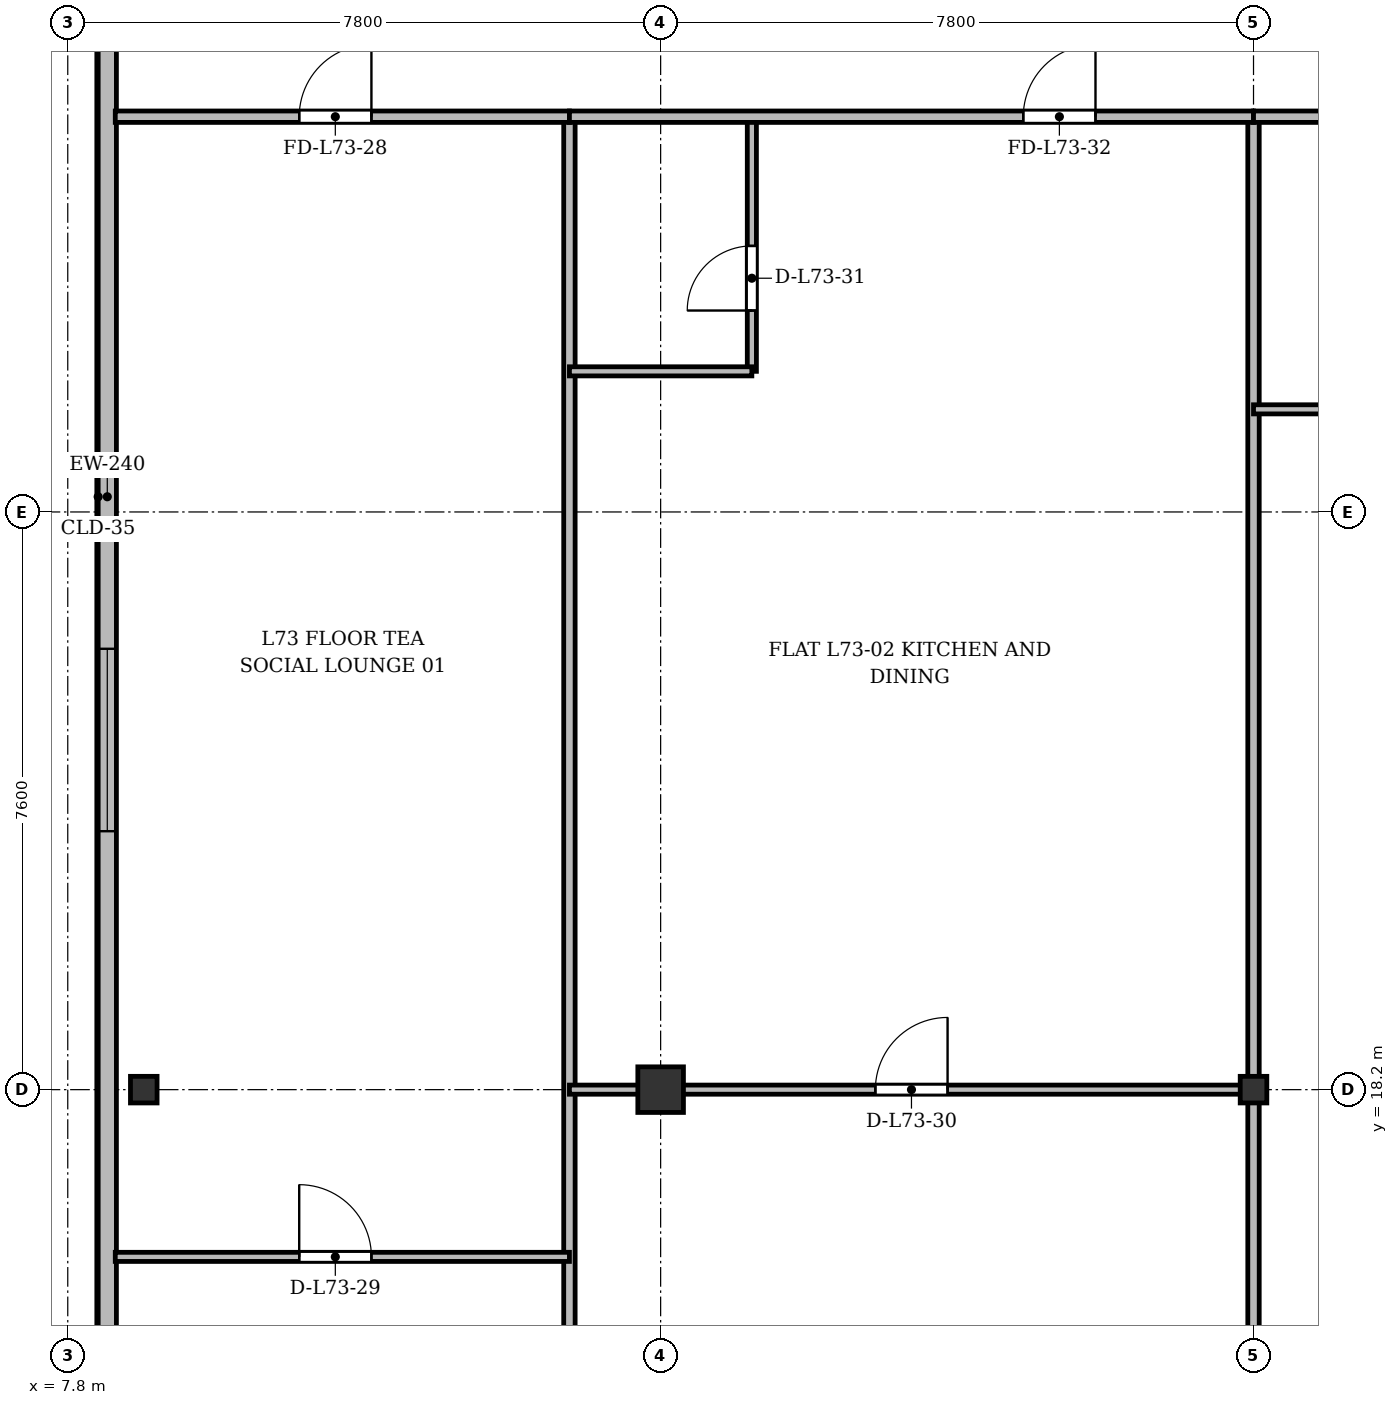
"""IFC4 building model, lengths in metres.
Left out: names, types, materials, properties, quantities, classifications, styles, units other than length and angle.
Written with IfcOpenShell. Run it as: python <this file> out.ifc"""

import sys

from ifc_helpers import new_model, si_unit, direction, frame, frame_2d, origin, origin_2d, place, context, subcontext, project, spatial, rectangle, i_section, extrude, source, transform, mapped, element, fill, save


model = new_model("IFC4")
c1 = context("Model", 3, precision=1e-05, world=origin(), true_north=direction((0.0, 1.0)))
c2 = subcontext(c1, "Body", "Model", "MODEL_VIEW")
j1 = project(units=[si_unit("LENGTHUNIT", "METRE"), si_unit("PLANEANGLEUNIT", "RADIAN")], contexts=[c1])
p1 = place(None, origin())
s1 = spatial("IfcSite", under=j1, at=p1, CompositionType="ELEMENT")
p2 = place(p1, origin())
s2 = spatial("IfcBuilding", under=s1, at=p2, CompositionType="ELEMENT")
p3 = place(p2, frame((0.0, 0.0, 281.1)))
s3 = spatial("IfcBuildingStorey", under=s2, at=p3, CompositionType="ELEMENT", Elevation=281.1)
m1 = source(origin(), c2, "Body", "SweptSolid", [
    extrude(i_section(OverallWidth=0.35, OverallDepth=0.35, WebThickness=0.018, FlangeThickness=0.028, at=origin_2d()), origin(), (0.0, 0.0, 1.0), 3.6),
])
p4 = place(p3, frame((8.8, 18.2, 0.0), z_axis=(0.0, 0.0, 1.0), x_axis=(1.0, 0.0, 0.0)))
e1 = element("IfcColumn", 1, at=p4, inside=s3, PredefinedType="COLUMN", context=c2, shape_type="MappedRepresentation", body=[
    mapped(m1, transform((0.0, 0.0, 0.0), x_axis=(1.0, 0.0, 0.0), y_axis=(0.0, 1.0, 0.0), z_axis=(0.0, 0.0, 1.0), scale=1.0)),
])
m2 = source(origin(), c2, "Body", "SweptSolid", [
    extrude(rectangle(XDim=0.6, YDim=0.6, at=origin_2d()), origin(), (0.0, 0.0, 1.0), 3.6),
])
p5 = place(p3, frame((15.6, 18.2, 0.0), z_axis=(0.0, 0.0, 1.0), x_axis=(1.0, 0.0, 0.0)))
e2 = element("IfcColumn", 2, at=p5, inside=s3, PredefinedType="COLUMN", context=c2, shape_type="MappedRepresentation", body=[
    mapped(m2, transform((0.0, 0.0, 0.0), x_axis=(1.0, 0.0, 0.0), y_axis=(0.0, 1.0, 0.0), z_axis=(0.0, 0.0, 1.0), scale=1.0)),
])
p6 = place(p3, frame((23.4, 18.2, 0.0), z_axis=(0.0, 0.0, 1.0), x_axis=(1.0, 0.0, 0.0)))
e3 = element("IfcColumn", 3, at=p6, inside=s3, PredefinedType="COLUMN", context=c2, shape_type="MappedRepresentation", body=[
    mapped(m1, transform((0.0, 0.0, 0.0), x_axis=(1.0, 0.0, 0.0), y_axis=(0.0, 1.0, 0.0), z_axis=(0.0, 0.0, 1.0), scale=1.0)),
])
p7 = place(p3, frame((8.32, 6.5, 0.0), z_axis=(0.0, 0.0, 1.0), x_axis=(0.0, 1.0, 0.0)))
e4 = element("IfcWall", 4, at=p7, inside=s3, PredefinedType="SOLIDWALL", context=c2, shape_type="SweptSolid", body=[
    extrude(rectangle(XDim=39.0, YDim=0.24, at=frame_2d((19.5, 0.0))), origin(), (0.0, 0.0, 1.0), 3.37),
])
p8 = place(p7, frame((1.45, 0.0, 0.92)))
e5 = element("IfcOpeningElement", 5, at=p8, cuts=e4, PredefinedType="OPENING", context=c2, shape_type="SweptSolid", body=[
    extrude(rectangle(XDim=1.2, YDim=1.65, at=frame_2d((0.6, 0.825))), frame((0.0, 0.13, 0.0), z_axis=(0.0, -1.0, 0.0), x_axis=(1.0, 0.0, 0.0)), (0.0, 0.0, 1.0), 0.26),
])
p9 = place(p7, frame((3.7, 0.0, 0.92)))
e6 = element("IfcOpeningElement", 6, at=p9, cuts=e4, PredefinedType="OPENING", context=c2, shape_type="SweptSolid", body=[
    extrude(rectangle(XDim=2.4, YDim=2.1, at=frame_2d((1.2, 1.05))), frame((0.0, 0.13, 0.0), z_axis=(0.0, -1.0, 0.0), x_axis=(1.0, 0.0, 0.0)), (0.0, 0.0, 1.0), 0.26),
])
p10 = place(p7, frame((15.1, 0.0, 0.92)))
e7 = element("IfcOpeningElement", 7, at=p10, cuts=e4, PredefinedType="OPENING", context=c2, shape_type="SweptSolid", body=[
    extrude(rectangle(XDim=2.4, YDim=2.1, at=frame_2d((1.2, 1.05))), frame((0.0, 0.13, 0.0), z_axis=(0.0, -1.0, 0.0), x_axis=(1.0, 0.0, 0.0)), (0.0, 0.0, 1.0), 0.26),
])
p11 = place(p7, frame((29.1, 0.0, 0.92)))
e8 = element("IfcOpeningElement", 8, at=p11, cuts=e4, PredefinedType="OPENING", context=c2, shape_type="SweptSolid", body=[
    extrude(rectangle(XDim=2.4, YDim=2.1, at=frame_2d((1.2, 1.05))), frame((0.0, 0.13, 0.0), z_axis=(0.0, -1.0, 0.0), x_axis=(1.0, 0.0, 0.0)), (0.0, 0.0, 1.0), 0.26),
])
p12 = place(p7, frame((36.65, 0.0, 0.92)))
e9 = element("IfcOpeningElement", 9, at=p12, cuts=e4, PredefinedType="OPENING", context=c2, shape_type="SweptSolid", body=[
    extrude(rectangle(XDim=1.2, YDim=1.65, at=frame_2d((0.6, 0.825))), frame((0.0, 0.13, 0.0), z_axis=(0.0, -1.0, 0.0), x_axis=(1.0, 0.0, 0.0)), (0.0, 0.0, 1.0), 0.26),
])
p13 = place(p3, frame((14.4, 3.725, 0.0), z_axis=(0.0, 0.0, 1.0), x_axis=(0.0, 1.0, 0.0)))
e10 = element("IfcWall", 10, at=p13, inside=s3, PredefinedType="PARTITIONING", context=c2, shape_type="SweptSolid", body=[
    extrude(rectangle(XDim=27.275, YDim=0.15, at=frame_2d((13.637, 0.0))), origin(), (0.0, 0.0, 1.0), 2.92),
])
p14 = place(p3, frame((23.4, 3.725, 0.0), z_axis=(0.0, 0.0, 1.0), x_axis=(0.0, 1.0, 0.0)))
e11 = element("IfcWall", 11, at=p14, inside=s3, PredefinedType="PARTITIONING", context=c2, shape_type="SweptSolid", body=[
    extrude(rectangle(XDim=27.275, YDim=0.15, at=frame_2d((13.637, 0.0))), origin(), (0.0, 0.0, 1.0), 2.87),
])
p15 = place(p3, frame((8.425, 31.0, 0.0), z_axis=(0.0, 0.0, 1.0), x_axis=(1.0, 0.0, 0.0)))
e12 = element("IfcWall", 12, at=p15, inside=s3, PredefinedType="PARTITIONING", context=c2, shape_type="SweptSolid", body=[
    extrude(rectangle(XDim=5.975, YDim=0.15, at=frame_2d((2.987, 0.0))), origin(), (0.0, 0.0, 1.0), 2.87),
])
p16 = place(p15, frame((2.42, 0.0, 0.0)))
e13 = element("IfcOpeningElement", 13, at=p16, cuts=e12, PredefinedType="OPENING", context=c2, shape_type="SweptSolid", body=[
    extrude(rectangle(XDim=0.95, YDim=2.15, at=frame_2d((0.475, 1.075))), frame((0.0, 0.085, 0.0), z_axis=(0.0, -1.0, 0.0), x_axis=(1.0, 0.0, 0.0)), (0.0, 0.0, 1.0), 0.17),
])
p17 = place(p3, frame((8.425, 16.0, 0.0), z_axis=(0.0, 0.0, 1.0), x_axis=(1.0, 0.0, 0.0)))
e14 = element("IfcWall", 14, at=p17, inside=s3, PredefinedType="PARTITIONING", context=c2, shape_type="SweptSolid", body=[
    extrude(rectangle(XDim=5.975, YDim=0.12, at=frame_2d((2.987, 0.0))), origin(), (0.0, 0.0, 1.0), 2.87),
])
p18 = place(p17, frame((2.42, 0.0, 0.0)))
e15 = element("IfcOpeningElement", 15, at=p18, cuts=e14, PredefinedType="OPENING", context=c2, shape_type="SweptSolid", body=[
    extrude(rectangle(XDim=0.95, YDim=2.15, at=frame_2d((0.475, 1.075))), frame((0.0, 0.07, 0.0), z_axis=(0.0, -1.0, 0.0), x_axis=(1.0, 0.0, 0.0)), (0.0, 0.0, 1.0), 0.14),
])
p19 = place(p3, frame((14.4, 18.2, 0.0), z_axis=(0.0, 0.0, 1.0), x_axis=(1.0, 0.0, 0.0)))
e16 = element("IfcWall", 16, at=p19, inside=s3, PredefinedType="PARTITIONING", context=c2, shape_type="SweptSolid", body=[
    extrude(rectangle(XDim=9.0, YDim=0.12, at=frame_2d((4.5, 0.0))), origin(), (0.0, 0.0, 1.0), 2.92),
])
p20 = place(p19, frame((4.025, 0.0, 0.0)))
e17 = element("IfcOpeningElement", 17, at=p20, cuts=e16, PredefinedType="OPENING", context=c2, shape_type="SweptSolid", body=[
    extrude(rectangle(XDim=0.95, YDim=2.15, at=frame_2d((0.475, 1.075))), frame((0.0, 0.07, 0.0), z_axis=(0.0, -1.0, 0.0), x_axis=(1.0, 0.0, 0.0)), (0.0, 0.0, 1.0), 0.14),
])
p21 = place(p3, frame((16.8, 27.65, 0.0), z_axis=(0.0, 0.0, 1.0), x_axis=(0.0, 1.0, 0.0)))
e18 = element("IfcWall", 18, at=p21, inside=s3, PredefinedType="PARTITIONING", context=c2, shape_type="SweptSolid", body=[
    extrude(rectangle(XDim=3.35, YDim=0.12, at=frame_2d((1.675, 0.0))), origin(), (0.0, 0.0, 1.0), 3.37),
])
p22 = place(p21, frame((0.8, 0.0, 0.0)))
e19 = element("IfcOpeningElement", 19, at=p22, cuts=e18, PredefinedType="OPENING", context=c2, shape_type="SweptSolid", body=[
    extrude(rectangle(XDim=0.85, YDim=2.1, at=frame_2d((0.425, 1.05))), frame((0.0, 0.07, 0.0), z_axis=(0.0, -1.0, 0.0), x_axis=(1.0, 0.0, 0.0)), (0.0, 0.0, 1.0), 0.14),
])
p23 = place(p3, frame((14.4, 27.65, 0.0), z_axis=(0.0, 0.0, 1.0), x_axis=(1.0, 0.0, 0.0)))
e20 = element("IfcWall", 20, at=p23, inside=s3, PredefinedType="PARTITIONING", context=c2, shape_type="SweptSolid", body=[
    extrude(rectangle(XDim=2.4, YDim=0.12, at=frame_2d((1.2, 0.0))), origin(), (0.0, 0.0, 1.0), 2.87),
])
p24 = place(p3, frame((14.4, 31.0, 0.0), z_axis=(0.0, 0.0, 1.0), x_axis=(1.0, 0.0, 0.0)))
e21 = element("IfcWall", 21, at=p24, inside=s3, PredefinedType="PARTITIONING", context=c2, shape_type="SweptSolid", body=[
    extrude(rectangle(XDim=9.0, YDim=0.15, at=frame_2d((4.5, 0.0))), origin(), (0.0, 0.0, 1.0), 2.87),
])
p25 = place(p24, frame((5.971, 0.0, 0.0)))
e22 = element("IfcOpeningElement", 22, at=p25, cuts=e21, PredefinedType="OPENING", context=c2, shape_type="SweptSolid", body=[
    extrude(rectangle(XDim=0.95, YDim=2.15, at=frame_2d((0.475, 1.075))), frame((0.0, 0.085, 0.0), z_axis=(0.0, -1.0, 0.0), x_axis=(1.0, 0.0, 0.0)), (0.0, 0.0, 1.0), 0.17),
])
p26 = place(p3, frame((23.4, 31.0, 0.0), z_axis=(0.0, 0.0, 1.0), x_axis=(1.0, 0.0, 0.0)))
e23 = element("IfcWall", 23, at=p26, inside=s3, PredefinedType="PARTITIONING", context=c2, shape_type="SweptSolid", body=[
    extrude(rectangle(XDim=4.0, YDim=0.15, at=frame_2d((2.0, 0.0))), origin(), (0.0, 0.0, 1.0), 2.87),
])
p27 = place(p26, frame((1.525, 0.0, 0.0)))
e24 = element("IfcOpeningElement", 24, at=p27, cuts=e23, PredefinedType="OPENING", context=c2, shape_type="SweptSolid", body=[
    extrude(rectangle(XDim=0.95, YDim=2.15, at=frame_2d((0.475, 1.075))), frame((0.0, 0.085, 0.0), z_axis=(0.0, -1.0, 0.0), x_axis=(1.0, 0.0, 0.0)), (0.0, 0.0, 1.0), 0.17),
])
p28 = place(p3, frame((23.4, 27.15, 0.0), z_axis=(0.0, 0.0, 1.0), x_axis=(1.0, 0.0, 0.0)))
e25 = element("IfcWall", 25, at=p28, inside=s3, PredefinedType="PARTITIONING", context=c2, shape_type="SweptSolid", body=[
    extrude(rectangle(XDim=4.0, YDim=0.12, at=frame_2d((2.0, 0.0))), origin(), (0.0, 0.0, 1.0), 2.87),
])
p29 = place(p28, frame((1.525, 0.0, 0.0)))
e26 = element("IfcOpeningElement", 26, at=p29, cuts=e25, PredefinedType="OPENING", context=c2, shape_type="SweptSolid", body=[
    extrude(rectangle(XDim=0.95, YDim=2.15, at=frame_2d((0.475, 1.075))), frame((0.0, 0.07, 0.0), z_axis=(0.0, -1.0, 0.0), x_axis=(1.0, 0.0, 0.0)), (0.0, 0.0, 1.0), 0.14),
])
m3 = source(origin(), c2, "Body", "SweptSolid", [
    extrude(rectangle(XDim=2.4, YDim=2.1, at=frame_2d((1.2, 1.05))), frame((0.0, 0.03, 0.0), z_axis=(0.0, -1.0, 0.0), x_axis=(1.0, 0.0, 0.0)), (0.0, 0.0, 1.0), 0.06),
])
p30 = place(p10, origin())
e27 = element("IfcWindow", 27, at=p30, inside=s3, PartitioningType="SINGLE_PANEL", PredefinedType="WINDOW", context=c2, shape_type="MappedRepresentation", body=[
    mapped(m3, transform((0.0, 0.0, 0.0), x_axis=(1.0, 0.0, 0.0), y_axis=(0.0, 1.0, 0.0), z_axis=(0.0, 0.0, 1.0), scale=1.0)),
])
fill(e7, e27)
m4 = source(origin(), c2, "Body", "SweptSolid", [
    extrude(rectangle(XDim=0.95, YDim=2.15, at=frame_2d((0.475, 1.075))), frame((0.0, 0.025, 0.0), z_axis=(0.0, -1.0, 0.0), x_axis=(1.0, 0.0, 0.0)), (0.0, 0.0, 1.0), 0.05),
])
p31 = place(p16, origin())
e28 = element("IfcDoor", 28, at=p31, inside=s3, OperationType="SINGLE_SWING_RIGHT", PredefinedType="DOOR", context=c2, shape_type="MappedRepresentation", body=[
    mapped(m4, transform((0.0, 0.0, 0.0), x_axis=(1.0, 0.0, 0.0), y_axis=(0.0, 1.0, 0.0), z_axis=(0.0, 0.0, 1.0), scale=1.0)),
])
fill(e13, e28)
p32 = place(p18, origin())
e29 = element("IfcDoor", 29, at=p32, inside=s3, OperationType="SINGLE_SWING_LEFT", PredefinedType="DOOR", context=c2, shape_type="MappedRepresentation", body=[
    mapped(m4, transform((0.0, 0.0, 0.0), x_axis=(1.0, 0.0, 0.0), y_axis=(0.0, 1.0, 0.0), z_axis=(0.0, 0.0, 1.0), scale=1.0)),
])
fill(e15, e29)
p33 = place(p20, origin())
e30 = element("IfcDoor", 30, at=p33, inside=s3, OperationType="SINGLE_SWING_RIGHT", PredefinedType="DOOR", context=c2, shape_type="MappedRepresentation", body=[
    mapped(m4, transform((0.0, 0.0, 0.0), x_axis=(1.0, 0.0, 0.0), y_axis=(0.0, 1.0, 0.0), z_axis=(0.0, 0.0, 1.0), scale=1.0)),
])
fill(e17, e30)
m5 = source(origin(), c2, "Body", "SweptSolid", [
    extrude(rectangle(XDim=0.85, YDim=2.1, at=frame_2d((0.425, 1.05))), frame((0.0, 0.025, 0.0), z_axis=(0.0, -1.0, 0.0), x_axis=(1.0, 0.0, 0.0)), (0.0, 0.0, 1.0), 0.05),
])
p34 = place(p22, origin())
e31 = element("IfcDoor", 31, at=p34, inside=s3, OperationType="SINGLE_SWING_LEFT", PredefinedType="DOOR", context=c2, shape_type="MappedRepresentation", body=[
    mapped(m5, transform((0.0, 0.0, 0.0), x_axis=(1.0, 0.0, 0.0), y_axis=(0.0, 1.0, 0.0), z_axis=(0.0, 0.0, 1.0), scale=1.0)),
])
fill(e19, e31)
p35 = place(p25, origin())
e32 = element("IfcDoor", 32, at=p35, inside=s3, OperationType="SINGLE_SWING_RIGHT", PredefinedType="DOOR", context=c2, shape_type="MappedRepresentation", body=[
    mapped(m4, transform((0.0, 0.0, 0.0), x_axis=(1.0, 0.0, 0.0), y_axis=(0.0, 1.0, 0.0), z_axis=(0.0, 0.0, 1.0), scale=1.0)),
])
fill(e22, e32)
save(model, sys.argv[1])
